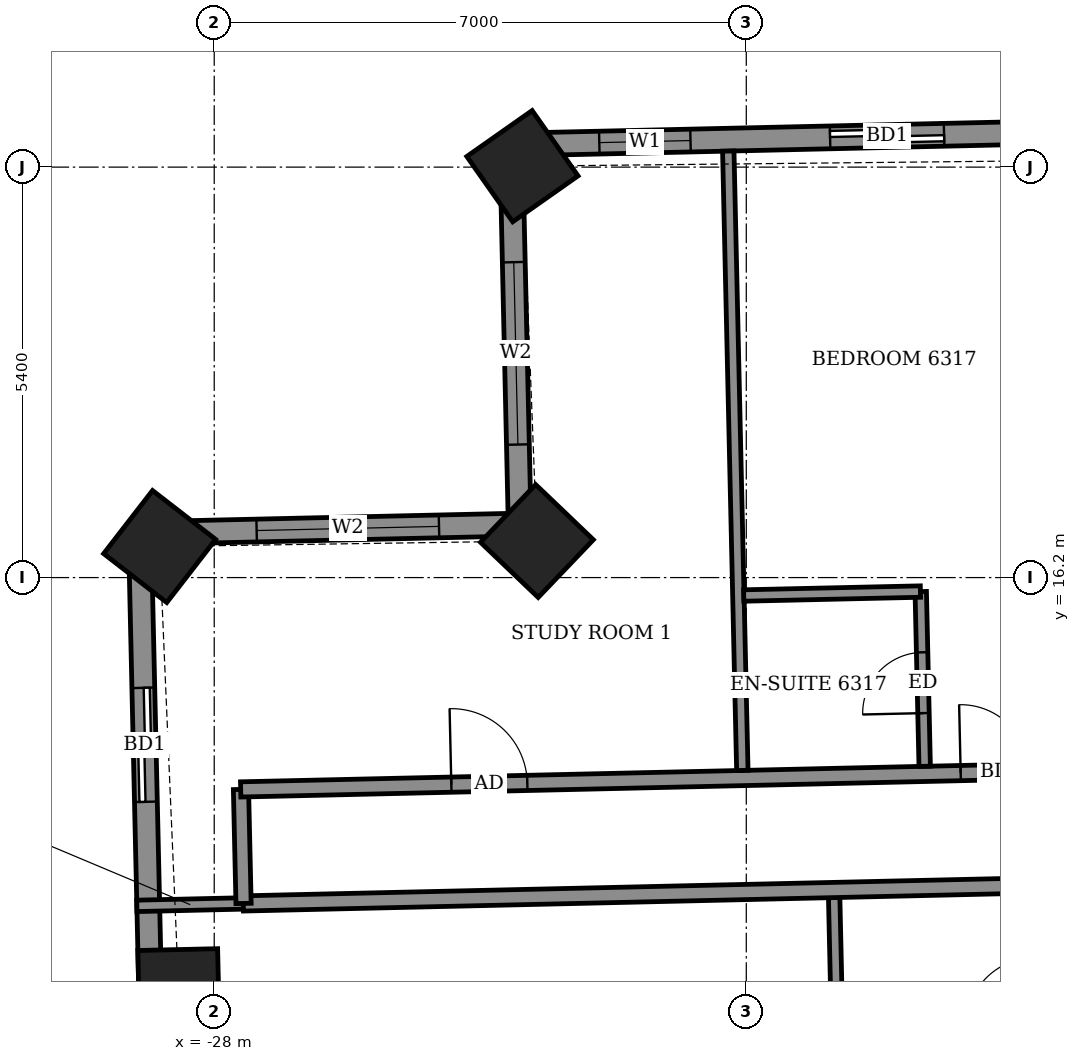
"""IFC4 building model, lengths in metres.
Left out: names, types, materials, properties, quantities, classifications, styles, units other than length and angle.
Written with IfcOpenShell. Run it as: python <this file> out.ifc"""

import sys

from ifc_helpers import new_model, si_unit, direction, frame, frame_2d, origin, origin_2d, place, context, subcontext, project, spatial, rectangle, extrude, element, fill, save


model = new_model("IFC4")
c1 = context("Model", 3, precision=1e-05, world=origin(), true_north=direction((0.0, 1.0)))
c2 = subcontext(c1, "Body", "Model", "MODEL_VIEW")
j1 = project(units=[si_unit("LENGTHUNIT", "METRE"), si_unit("PLANEANGLEUNIT", "RADIAN")], contexts=[c1])
p1 = place(None, origin())
s1 = spatial("IfcSite", under=j1, at=p1, CompositionType="ELEMENT")
p2 = place(p1, origin())
s2 = spatial("IfcBuilding", under=s1, at=p2, CompositionType="ELEMENT")
p3 = place(p2, frame((0.0, 0.0, 249.1)))
s3 = spatial("IfcBuildingStorey", under=s2, at=p3, CompositionType="ELEMENT", Elevation=249.1)
for number, where, z_axis, x_axis in (
    (1, (-23.945, 21.613, -0.55), (0.0, 0.0, 1.0), (-0.818, -0.575, 0.0)),
    (2, (-23.754, 16.681, -0.55), (0.0, 0.0, 1.0), (-0.691, -0.723, 0.0)),
    (3, (-28.718, 16.609, -0.55), (0.0, 0.0, 1.0), (-0.612, -0.791, 0.0)),
    (4, (-28.468, 10.781, -0.55), (0.0, 0.0, 1.0), (0.023, -1.0, 0.0)),
):
    element("IfcColumn", number, at=place(p3, frame(where, z_axis=z_axis, x_axis=x_axis)), inside=s3, PredefinedType="COLUMN", context=c2, shape_type="SweptSolid", body=[
        extrude(rectangle(XDim=1.05, YDim=1.05, at=origin_2d()), origin(), (0.0, 0.0, 1.0), 3.6),
    ])
p4 = place(p3, frame((20.403, 22.905, 0.0), z_axis=(0.0, 0.0, 1.0), x_axis=(-0.99974298964, -0.022670568288, 0.0)))
e5 = element("IfcWall", 5, at=p4, inside=s3, PredefinedType="SOLIDWALL", context=c2, shape_type="SweptSolid", body=[
    extrude(rectangle(XDim=44.509, YDim=0.3, at=frame_2d((22.254, 0.0))), origin(), (0.0, 0.0, 1.0), 2.5),
])
p5 = place(p4, frame((1.272, 0.0, 0.0)))
e6 = element("IfcOpeningElement", 6, at=p5, cuts=e5, PredefinedType="OPENING", context=c2, shape_type="SweptSolid", body=[
    extrude(rectangle(XDim=1.5, YDim=2.4, at=frame_2d((0.75, 1.2))), frame((0.0, 0.16, 0.0), z_axis=(0.0, -1.0, 0.0), x_axis=(1.0, 0.0, 0.0)), (0.0, 0.0, 1.0), 0.32),
])
p6 = place(p4, frame((4.501, 0.0, 0.0)))
e7 = element("IfcOpeningElement", 7, at=p6, cuts=e5, PredefinedType="OPENING", context=c2, shape_type="SweptSolid", body=[
    extrude(rectangle(XDim=1.5, YDim=2.4, at=frame_2d((0.75, 1.2))), frame((0.0, 0.16, 0.0), z_axis=(0.0, -1.0, 0.0), x_axis=(1.0, 0.0, 0.0)), (0.0, 0.0, 1.0), 0.32),
])
p7 = place(p4, frame((9.058, 0.0, 0.0)))
e8 = element("IfcOpeningElement", 8, at=p7, cuts=e5, PredefinedType="OPENING", context=c2, shape_type="SweptSolid", body=[
    extrude(rectangle(XDim=1.5, YDim=2.4, at=frame_2d((0.75, 1.2))), frame((0.0, 0.16, 0.0), z_axis=(0.0, -1.0, 0.0), x_axis=(1.0, 0.0, 0.0)), (0.0, 0.0, 1.0), 0.32),
])
p8 = place(p4, frame((12.46, 0.0, 0.0)))
e9 = element("IfcOpeningElement", 9, at=p8, cuts=e5, PredefinedType="OPENING", context=c2, shape_type="SweptSolid", body=[
    extrude(rectangle(XDim=1.5, YDim=2.4, at=frame_2d((0.75, 1.2))), frame((0.0, 0.16, 0.0), z_axis=(0.0, -1.0, 0.0), x_axis=(1.0, 0.0, 0.0)), (0.0, 0.0, 1.0), 0.32),
])
p9 = place(p4, frame((17.533, 0.0, 0.0)))
e10 = element("IfcOpeningElement", 10, at=p9, cuts=e5, PredefinedType="OPENING", context=c2, shape_type="SweptSolid", body=[
    extrude(rectangle(XDim=1.5, YDim=2.4, at=frame_2d((0.75, 1.2))), frame((0.0, 0.16, 0.0), z_axis=(0.0, -1.0, 0.0), x_axis=(1.0, 0.0, 0.0)), (0.0, 0.0, 1.0), 0.32),
])
p10 = place(p4, frame((22.993, 0.0, 0.0)))
e11 = element("IfcOpeningElement", 11, at=p10, cuts=e5, PredefinedType="OPENING", context=c2, shape_type="SweptSolid", body=[
    extrude(rectangle(XDim=1.2, YDim=2.4, at=frame_2d((0.6, 1.2))), frame((0.0, 0.16, 0.0), z_axis=(0.0, -1.0, 0.0), x_axis=(1.0, 0.0, 0.0)), (0.0, 0.0, 1.0), 0.32),
])
p11 = place(p4, frame((26.033, 0.0, 0.0)))
e12 = element("IfcOpeningElement", 12, at=p11, cuts=e5, PredefinedType="OPENING", context=c2, shape_type="SweptSolid", body=[
    extrude(rectangle(XDim=1.5, YDim=2.4, at=frame_2d((0.75, 1.2))), frame((0.0, 0.16, 0.0), z_axis=(0.0, -1.0, 0.0), x_axis=(1.0, 0.0, 0.0)), (0.0, 0.0, 1.0), 0.32),
])
p12 = place(p4, frame((30.827, 0.0, 0.0)))
e13 = element("IfcOpeningElement", 13, at=p12, cuts=e5, PredefinedType="OPENING", context=c2, shape_type="SweptSolid", body=[
    extrude(rectangle(XDim=1.5, YDim=2.4, at=frame_2d((0.75, 1.2))), frame((0.0, 0.16, 0.0), z_axis=(0.0, -1.0, 0.0), x_axis=(1.0, 0.0, 0.0)), (0.0, 0.0, 1.0), 0.32),
])
p13 = place(p4, frame((34.286, 0.0, 0.0)))
e14 = element("IfcOpeningElement", 14, at=p13, cuts=e5, PredefinedType="OPENING", context=c2, shape_type="SweptSolid", body=[
    extrude(rectangle(XDim=1.5, YDim=2.4, at=frame_2d((0.75, 1.2))), frame((0.0, 0.16, 0.0), z_axis=(0.0, -1.0, 0.0), x_axis=(1.0, 0.0, 0.0)), (0.0, 0.0, 1.0), 0.32),
])
p14 = place(p4, frame((38.811, 0.0, 0.0)))
e15 = element("IfcOpeningElement", 15, at=p14, cuts=e5, PredefinedType="OPENING", context=c2, shape_type="SweptSolid", body=[
    extrude(rectangle(XDim=1.5, YDim=2.4, at=frame_2d((0.75, 1.2))), frame((0.0, 0.16, 0.0), z_axis=(0.0, -1.0, 0.0), x_axis=(1.0, 0.0, 0.0)), (0.0, 0.0, 1.0), 0.32),
])
p15 = place(p4, frame((42.148, 0.0, 0.9)))
e16 = element("IfcOpeningElement", 16, at=p15, cuts=e5, PredefinedType="OPENING", context=c2, shape_type="SweptSolid", body=[
    extrude(rectangle(XDim=1.2, YDim=1.5, at=frame_2d((0.6, 0.75))), frame((0.0, 0.16, 0.0), z_axis=(0.0, -1.0, 0.0), x_axis=(1.0, 0.0, 0.0)), (0.0, 0.0, 1.0), 0.32),
])
p16 = place(p3, frame((-24.094, 21.896, 0.0), z_axis=(0.0, 0.0, 1.0), x_axis=(0.022606059803, -0.999744450377, 0.0)))
e17 = element("IfcWall", 17, at=p16, inside=s3, PredefinedType="SOLIDWALL", context=c2, shape_type="SweptSolid", body=[
    extrude(rectangle(XDim=5.0, YDim=0.3, at=frame_2d((2.5, 0.0))), origin(), (0.0, 0.0, 1.0), 2.55),
])
p17 = place(p16, frame((1.547, 0.0, 0.9)))
e18 = element("IfcOpeningElement", 18, at=p17, cuts=e17, PredefinedType="OPENING", context=c2, shape_type="SweptSolid", body=[
    extrude(rectangle(XDim=2.4, YDim=1.5, at=frame_2d((1.2, 0.75))), frame((0.0, 0.16, 0.0), z_axis=(0.0, -1.0, 0.0), x_axis=(1.0, 0.0, 0.0)), (0.0, 0.0, 1.0), 0.32),
])
p18 = place(p3, frame((-23.645, 16.905, 0.0), z_axis=(0.0, 0.0, 1.0), x_axis=(-0.999742402201, -0.022696458783, 0.0)))
e19 = element("IfcWall", 19, at=p18, inside=s3, PredefinedType="SOLIDWALL", context=c2, shape_type="SweptSolid", body=[
    extrude(rectangle(XDim=5.335, YDim=0.3, at=frame_2d((2.668, 0.0))), origin(), (0.0, 0.0, 1.0), 2.55),
])
p19 = place(p18, frame((1.398, 0.0, 0.9)))
e20 = element("IfcOpeningElement", 20, at=p19, cuts=e19, PredefinedType="OPENING", context=c2, shape_type="SweptSolid", body=[
    extrude(rectangle(XDim=2.4, YDim=1.5, at=frame_2d((1.2, 0.75))), frame((0.0, 0.16, 0.0), z_axis=(0.0, -1.0, 0.0), x_axis=(1.0, 0.0, 0.0)), (0.0, 0.0, 1.0), 0.32),
])
p20 = place(p3, frame((-28.979, 16.784, 0.0), z_axis=(0.0, 0.0, 1.0), x_axis=(0.022685159264, -0.999742658662, 0.0)))
e21 = element("IfcWall", 21, at=p20, inside=s3, PredefinedType="SOLIDWALL", context=c2, shape_type="SweptSolid", body=[
    extrude(rectangle(XDim=12.699, YDim=0.3, at=frame_2d((6.35, 0.0))), origin(), (0.0, 0.0, 1.0), 2.55),
])
p21 = place(p20, frame((2.035, 0.0, 0.0)))
e22 = element("IfcOpeningElement", 22, at=p21, cuts=e21, PredefinedType="OPENING", context=c2, shape_type="SweptSolid", body=[
    extrude(rectangle(XDim=1.5, YDim=2.4, at=frame_2d((0.75, 1.2))), frame((0.0, 0.16, 0.0), z_axis=(0.0, -1.0, 0.0), x_axis=(1.0, 0.0, 0.0)), (0.0, 0.0, 1.0), 0.32),
])
p22 = place(p20, frame((7.894, 0.0, 0.9)))
e23 = element("IfcOpeningElement", 23, at=p22, cuts=e21, PredefinedType="OPENING", context=c2, shape_type="SweptSolid", body=[
    extrude(rectangle(XDim=2.4, YDim=1.5, at=frame_2d((1.2, 0.75))), frame((0.0, 0.16, 0.0), z_axis=(0.0, -1.0, 0.0), x_axis=(1.0, 0.0, 0.0)), (0.0, 0.0, 1.0), 0.32),
])
p23 = place(p3, frame((-19.783, 9.29, 0.0), z_axis=(0.0, 0.0, 1.0), x_axis=(-0.022600248254, 0.99974458177, 0.0)))
e24 = element("IfcWall", 24, at=p23, inside=s3, PredefinedType="PARTITIONING", context=c2, shape_type="SweptSolid", body=[
    extrude(rectangle(XDim=2.701, YDim=0.15, at=frame_2d((1.35, 0.0))), origin(), (0.0, 0.0, 1.0), 3.05),
])
p24 = place(p3, frame((-29.018, 11.881, 0.0), z_axis=(0.0, 0.0, 1.0), x_axis=(0.999740667531, 0.022772739949, 0.0)))
e25 = element("IfcWall", 25, at=p24, inside=s3, PredefinedType="PARTITIONING", context=c2, shape_type="SweptSolid", body=[
    extrude(rectangle(XDim=1.404, YDim=0.15, at=frame_2d((0.702, 0.0))), origin(), (0.0, 0.0, 1.0), 2.55),
])
p25 = place(p3, frame((-27.618, 11.913, 0.0), z_axis=(0.0, 0.0, 1.0), x_axis=(0.999741483035, 0.022736910479, 0.0)))
e26 = element("IfcWall", 26, at=p25, inside=s3, PredefinedType="PARTITIONING", context=c2, shape_type="SweptSolid", body=[
    extrude(rectangle(XDim=10.373, YDim=0.2, at=frame_2d((5.186, 0.0))), origin(), (0.0, 0.0, 1.0), 3.05),
])
p26 = place(p3, frame((-27.614, 11.913, 0.0), z_axis=(0.0, 0.0, 1.0), x_axis=(-0.022617910375, 0.999744182344, 0.0)))
e27 = element("IfcWall", 27, at=p26, inside=s3, PredefinedType="PARTITIONING", context=c2, shape_type="SweptSolid", body=[
    extrude(rectangle(XDim=1.5, YDim=0.2, at=frame_2d((0.75, 0.0))), origin(), (0.0, 0.0, 1.0), 3.05),
])
p27 = place(p3, frame((-27.652, 13.413, 0.0), z_axis=(0.0, 0.0, 1.0), x_axis=(0.999742864992, 0.022676064408, 0.0)))
e28 = element("IfcWall", 28, at=p27, inside=s3, PredefinedType="PARTITIONING", context=c2, shape_type="SweptSolid", body=[
    extrude(rectangle(XDim=50.882, YDim=0.2, at=frame_2d((25.441, 0.0))), origin(), (0.0, 0.0, 1.0), 3.05),
])
p28 = place(p27, frame((47.801, 0.0, 0.0)))
e29 = element("IfcOpeningElement", 29, at=p28, cuts=e28, PredefinedType="OPENING", context=c2, shape_type="SweptSolid", body=[
    extrude(rectangle(XDim=1.0, YDim=2.1, at=frame_2d((0.5, 1.05))), frame((0.0, 0.11, 0.0), z_axis=(0.0, -1.0, 0.0), x_axis=(1.0, 0.0, 0.0)), (0.0, 0.0, 1.0), 0.22),
])
p29 = place(p27, frame((43.425, 0.0, 0.0)))
e30 = element("IfcOpeningElement", 30, at=p29, cuts=e28, PredefinedType="OPENING", context=c2, shape_type="SweptSolid", body=[
    extrude(rectangle(XDim=0.9, YDim=2.1, at=frame_2d((0.45, 1.05))), frame((0.0, 0.11, 0.0), z_axis=(0.0, -1.0, 0.0), x_axis=(1.0, 0.0, 0.0)), (0.0, 0.0, 1.0), 0.22),
])
p30 = place(p27, frame((36.8, 0.0, 0.0)))
e31 = element("IfcOpeningElement", 31, at=p30, cuts=e28, PredefinedType="OPENING", context=c2, shape_type="SweptSolid", body=[
    extrude(rectangle(XDim=0.9, YDim=2.1, at=frame_2d((0.45, 1.05))), frame((0.0, 0.11, 0.0), z_axis=(0.0, -1.0, 0.0), x_axis=(1.0, 0.0, 0.0)), (0.0, 0.0, 1.0), 0.22),
])
p31 = place(p27, frame((34.975, 0.0, 0.0)))
e32 = element("IfcOpeningElement", 32, at=p31, cuts=e28, PredefinedType="OPENING", context=c2, shape_type="SweptSolid", body=[
    extrude(rectangle(XDim=0.9, YDim=2.1, at=frame_2d((0.45, 1.05))), frame((0.0, 0.11, 0.0), z_axis=(0.0, -1.0, 0.0), x_axis=(1.0, 0.0, 0.0)), (0.0, 0.0, 1.0), 0.22),
])
p32 = place(p27, frame((28.325, 0.0, 0.0)))
e33 = element("IfcOpeningElement", 33, at=p32, cuts=e28, PredefinedType="OPENING", context=c2, shape_type="SweptSolid", body=[
    extrude(rectangle(XDim=0.9, YDim=2.1, at=frame_2d((0.45, 1.05))), frame((0.0, 0.11, 0.0), z_axis=(0.0, -1.0, 0.0), x_axis=(1.0, 0.0, 0.0)), (0.0, 0.0, 1.0), 0.22),
])
p33 = place(p27, frame((26.475, 0.0, 0.0)))
e34 = element("IfcOpeningElement", 34, at=p33, cuts=e28, PredefinedType="OPENING", context=c2, shape_type="SweptSolid", body=[
    extrude(rectangle(XDim=0.9, YDim=2.1, at=frame_2d((0.45, 1.05))), frame((0.0, 0.11, 0.0), z_axis=(0.0, -1.0, 0.0), x_axis=(1.0, 0.0, 0.0)), (0.0, 0.0, 1.0), 0.22),
])
p34 = place(p27, frame((19.825, 0.0, 0.0)))
e35 = element("IfcOpeningElement", 35, at=p34, cuts=e28, PredefinedType="OPENING", context=c2, shape_type="SweptSolid", body=[
    extrude(rectangle(XDim=0.9, YDim=2.1, at=frame_2d((0.45, 1.05))), frame((0.0, 0.11, 0.0), z_axis=(0.0, -1.0, 0.0), x_axis=(1.0, 0.0, 0.0)), (0.0, 0.0, 1.0), 0.22),
])
p35 = place(p27, frame((17.975, 0.0, 0.0)))
e36 = element("IfcOpeningElement", 36, at=p35, cuts=e28, PredefinedType="OPENING", context=c2, shape_type="SweptSolid", body=[
    extrude(rectangle(XDim=0.9, YDim=2.1, at=frame_2d((0.45, 1.05))), frame((0.0, 0.11, 0.0), z_axis=(0.0, -1.0, 0.0), x_axis=(1.0, 0.0, 0.0)), (0.0, 0.0, 1.0), 0.22),
])
p36 = place(p27, frame((11.325, 0.0, 0.0)))
e37 = element("IfcOpeningElement", 37, at=p36, cuts=e28, PredefinedType="OPENING", context=c2, shape_type="SweptSolid", body=[
    extrude(rectangle(XDim=0.9, YDim=2.1, at=frame_2d((0.45, 1.05))), frame((0.0, 0.11, 0.0), z_axis=(0.0, -1.0, 0.0), x_axis=(1.0, 0.0, 0.0)), (0.0, 0.0, 1.0), 0.22),
])
p37 = place(p27, frame((9.475, 0.0, 0.0)))
e38 = element("IfcOpeningElement", 38, at=p37, cuts=e28, PredefinedType="OPENING", context=c2, shape_type="SweptSolid", body=[
    extrude(rectangle(XDim=0.9, YDim=2.1, at=frame_2d((0.45, 1.05))), frame((0.0, 0.11, 0.0), z_axis=(0.0, -1.0, 0.0), x_axis=(1.0, 0.0, 0.0)), (0.0, 0.0, 1.0), 0.22),
])
p38 = place(p27, frame((2.772, 0.0, 0.0)))
e39 = element("IfcOpeningElement", 39, at=p38, cuts=e28, PredefinedType="OPENING", context=c2, shape_type="SweptSolid", body=[
    extrude(rectangle(XDim=1.0, YDim=2.1, at=frame_2d((0.5, 1.05))), frame((0.0, 0.11, 0.0), z_axis=(0.0, -1.0, 0.0), x_axis=(1.0, 0.0, 0.0)), (0.0, 0.0, 1.0), 0.22),
])
p39 = place(p3, frame((-21.052, 13.663, 0.0), z_axis=(0.0, 0.0, 1.0), x_axis=(-0.022706435224, 0.999742175663, 0.0)))
e40 = element("IfcWall", 40, at=p39, inside=s3, PredefinedType="PARTITIONING", context=c2, shape_type="SweptSolid", body=[
    extrude(rectangle(XDim=8.15, YDim=0.15, at=frame_2d((4.075, 0.0))), origin(), (0.0, 0.0, 1.0), 2.5),
])
p40 = place(p3, frame((-18.653, 13.717, 0.0), z_axis=(0.0, 0.0, 1.0), x_axis=(-0.022612884682, 0.999744296031, 0.0)))
e41 = element("IfcWall", 41, at=p40, inside=s3, PredefinedType="PARTITIONING", context=c2, shape_type="SweptSolid", body=[
    extrude(rectangle(XDim=2.3, YDim=0.15, at=frame_2d((1.15, 0.0))), origin(), (0.0, 0.0, 1.0), 3.05),
])
p41 = place(p40, frame((0.7, 0.0, 0.0)))
e42 = element("IfcOpeningElement", 42, at=p41, cuts=e41, PredefinedType="OPENING", context=c2, shape_type="SweptSolid", body=[
    extrude(rectangle(XDim=0.8, YDim=2.1, at=frame_2d((0.4, 1.05))), frame((0.0, 0.085, 0.0), z_axis=(0.0, -1.0, 0.0), x_axis=(1.0, 0.0, 0.0)), (0.0, 0.0, 1.0), 0.17),
])
p42 = place(p3, frame((-21.034, 15.964, 0.0), z_axis=(0.0, 0.0, 1.0), x_axis=(0.999749954681, 0.022361308448, 0.0)))
e43 = element("IfcWall", 43, at=p42, inside=s3, PredefinedType="PARTITIONING", context=c2, shape_type="SweptSolid", body=[
    extrude(rectangle(XDim=2.325, YDim=0.15, at=frame_2d((1.163, 0.0))), origin(), (0.0, 0.0, 1.0), 3.05),
])
p43 = place(p14, origin())
e44 = element("IfcDoor", 44, at=p43, inside=s3, OperationType="SLIDING_TO_LEFT", PredefinedType="DOOR", context=c2, shape_type="SweptSolid", body=[
    extrude(rectangle(XDim=1.5, YDim=2.4, at=frame_2d((0.75, 1.2))), frame((0.0, 0.025, 0.0), z_axis=(0.0, -1.0, 0.0), x_axis=(1.0, 0.0, 0.0)), (0.0, 0.0, 1.0), 0.05),
])
fill(e15, e44)
p44 = place(p15, origin())
e45 = element("IfcWindow", 45, at=p44, inside=s3, PartitioningType="SINGLE_PANEL", PredefinedType="WINDOW", context=c2, shape_type="SweptSolid", body=[
    extrude(rectangle(XDim=1.2, YDim=1.5, at=frame_2d((0.6, 0.75))), frame((0.0, 0.03, 0.0), z_axis=(0.0, -1.0, 0.0), x_axis=(1.0, 0.0, 0.0)), (0.0, 0.0, 1.0), 0.06),
])
fill(e16, e45)
p45 = place(p17, origin())
e46 = element("IfcWindow", 46, at=p45, inside=s3, PartitioningType="DOUBLE_PANEL_VERTICAL", PredefinedType="WINDOW", context=c2, shape_type="SweptSolid", body=[
    extrude(rectangle(XDim=2.4, YDim=1.5, at=frame_2d((1.2, 0.75))), frame((0.0, 0.03, 0.0), z_axis=(0.0, -1.0, 0.0), x_axis=(1.0, 0.0, 0.0)), (0.0, 0.0, 1.0), 0.06),
])
fill(e18, e46)
p46 = place(p19, origin())
e47 = element("IfcWindow", 47, at=p46, inside=s3, PartitioningType="DOUBLE_PANEL_VERTICAL", PredefinedType="WINDOW", context=c2, shape_type="SweptSolid", body=[
    extrude(rectangle(XDim=2.4, YDim=1.5, at=frame_2d((1.2, 0.75))), frame((0.0, 0.03, 0.0), z_axis=(0.0, -1.0, 0.0), x_axis=(1.0, 0.0, 0.0)), (0.0, 0.0, 1.0), 0.06),
])
fill(e20, e47)
p47 = place(p21, origin())
e48 = element("IfcDoor", 48, at=p47, inside=s3, OperationType="SLIDING_TO_LEFT", PredefinedType="DOOR", context=c2, shape_type="SweptSolid", body=[
    extrude(rectangle(XDim=1.5, YDim=2.4, at=frame_2d((0.75, 1.2))), frame((0.0, 0.025, 0.0), z_axis=(0.0, -1.0, 0.0), x_axis=(1.0, 0.0, 0.0)), (0.0, 0.0, 1.0), 0.05),
])
fill(e22, e48)
p48 = place(p37, origin())
e49 = element("IfcDoor", 49, at=p48, inside=s3, OperationType="SINGLE_SWING_LEFT", PredefinedType="DOOR", context=c2, shape_type="SweptSolid", body=[
    extrude(rectangle(XDim=0.9, YDim=2.1, at=frame_2d((0.45, 1.05))), frame((0.0, 0.025, 0.0), z_axis=(0.0, -1.0, 0.0), x_axis=(1.0, 0.0, 0.0)), (0.0, 0.0, 1.0), 0.05),
])
fill(e38, e49)
p49 = place(p41, origin())
e50 = element("IfcDoor", 50, at=p49, inside=s3, OperationType="SINGLE_SWING_LEFT", PredefinedType="DOOR", context=c2, shape_type="SweptSolid", body=[
    extrude(rectangle(XDim=0.8, YDim=2.1, at=frame_2d((0.4, 1.05))), frame((0.0, 0.025, 0.0), z_axis=(0.0, -1.0, 0.0), x_axis=(1.0, 0.0, 0.0)), (0.0, 0.0, 1.0), 0.05),
])
fill(e42, e50)
p50 = place(p38, origin())
e51 = element("IfcDoor", 51, at=p50, inside=s3, OperationType="SINGLE_SWING_RIGHT", PredefinedType="DOOR", context=c2, shape_type="SweptSolid", body=[
    extrude(rectangle(XDim=1.0, YDim=2.1, at=frame_2d((0.5, 1.05))), frame((0.0, 0.025, 0.0), z_axis=(0.0, -1.0, 0.0), x_axis=(1.0, 0.0, 0.0)), (0.0, 0.0, 1.0), 0.05),
])
fill(e39, e51)
save(model, sys.argv[1])
